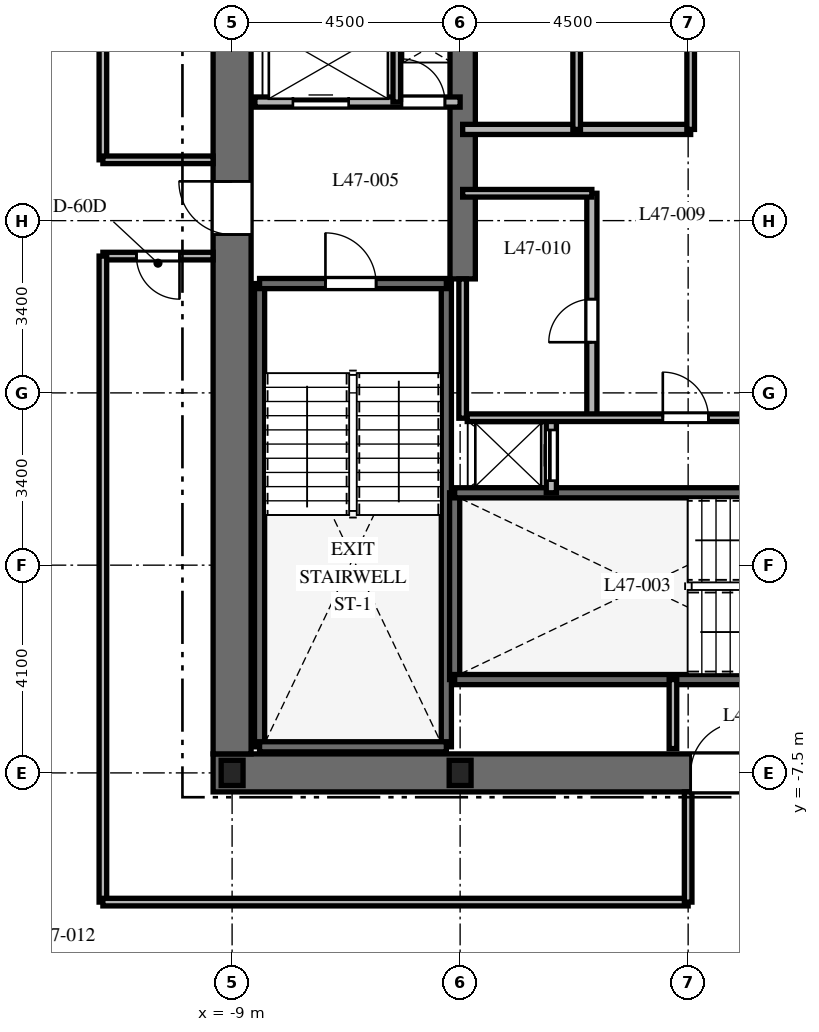
"""IFC4 building model, lengths in metres.
Left out: names, types, materials, properties, quantities, classifications, styles, units other than length and angle.
Written with IfcOpenShell. Run it as: python <this file> out.ifc"""

import sys

from ifc_helpers import new_model, si_unit, direction, frame, frame_2d, origin, origin_2d, place, context, subcontext, project, spatial, rectangle, i_section, extrude, element, fill, save


model = new_model("IFC4")
c1 = context("Model", 3, precision=1e-05, world=origin(), true_north=direction((0.0, 1.0)))
c2 = subcontext(c1, "Body", "Model", "MODEL_VIEW")
j1 = project(units=[si_unit("LENGTHUNIT", "METRE"), si_unit("PLANEANGLEUNIT", "RADIAN")], contexts=[c1])
p1 = place(None, origin())
s1 = spatial("IfcSite", under=j1, at=p1, CompositionType="ELEMENT")
p2 = place(p1, origin())
s2 = spatial("IfcBuilding", under=s1, at=p2, CompositionType="ELEMENT")
p3 = place(p2, frame((0.0, 0.0, 190.4)))
s3 = spatial("IfcBuildingStorey", under=s2, at=p3, CompositionType="ELEMENT", Elevation=190.4)
p4 = place(p3, frame((-9.375, -7.5, 0.0), z_axis=(0.0, 0.0, 1.0), x_axis=(1.0, 0.0, 0.0)))
e1 = element("IfcWall", 1, at=p4, inside=s3, PredefinedType="SHEAR", context=c2, shape_type="SweptSolid", body=[
    extrude(rectangle(XDim=18.75, YDim=0.75, at=frame_2d((9.375, 0.0))), origin(), (0.0, 0.0, 1.0), 3.7),
])
p5 = place(p4, frame((9.425, 0.0, 0.0)))
e2 = element("IfcOpeningElement", 2, at=p5, cuts=e1, PredefinedType="OPENING", context=c2, shape_type="SweptSolid", body=[
    extrude(rectangle(XDim=1.0, YDim=2.15, at=frame_2d((0.5, 1.075))), frame((0.0, 0.385, 0.0), z_axis=(0.0, -1.0, 0.0), x_axis=(1.0, 0.0, 0.0)), (0.0, 0.0, 1.0), 0.77),
])
p6 = place(p3, frame((-9.0, -7.125, 0.0), z_axis=(0.0, 0.0, 1.0), x_axis=(0.0, 1.0, 0.0)))
e3 = element("IfcWall", 3, at=p6, inside=s3, PredefinedType="SHEAR", context=c2, shape_type="SweptSolid", body=[
    extrude(rectangle(XDim=14.25, YDim=0.75, at=frame_2d((7.125, 0.0))), origin(), (0.0, 0.0, 1.0), 3.7),
])
p7 = place(p6, frame((10.25, 0.0, 0.0)))
e4 = element("IfcOpeningElement", 4, at=p7, cuts=e3, PredefinedType="OPENING", context=c2, shape_type="SweptSolid", body=[
    extrude(rectangle(XDim=1.05, YDim=2.15, at=frame_2d((0.525, 1.075))), frame((0.0, 0.385, 0.0), z_axis=(0.0, -1.0, 0.0), x_axis=(1.0, 0.0, 0.0)), (0.0, 0.0, 1.0), 0.77),
])
p8 = place(p3, frame((-4.45, 2.25, 0.0), z_axis=(0.0, 0.0, 1.0), x_axis=(0.0, 1.0, 0.0)))
e5 = element("IfcWall", 5, at=p8, inside=s3, PredefinedType="SHEAR", context=c2, shape_type="SweptSolid", body=[
    extrude(rectangle(XDim=4.875, YDim=0.5, at=frame_2d((2.438, 0.0))), origin(), (0.0, 0.0, 1.0), 3.7),
])
for number, where, z_axis, x_axis in (
    (6, (-8.458, -6.985, 0.0), (0.0, 0.0, 1.0), (0.0, 1.0, 0.0)),
    (7, (-4.772, -6.985, 0.0), (0.0, 0.0, 1.0), (0.0, 1.0, 0.0)),
):
    element("IfcWall", number, at=place(p3, frame(where, z_axis=z_axis, x_axis=x_axis)), inside=s3, PredefinedType="SHEAR", context=c2, shape_type="SweptSolid", body=[
        extrude(rectangle(XDim=9.143, YDim=0.2, at=frame_2d((4.572, 0.0))), origin(), (0.0, 0.0, 1.0), 3.7),
    ])
p9 = place(p3, frame((-8.458, -6.985, 0.0), z_axis=(0.0, 0.0, 1.0), x_axis=(1.0, 0.0, 0.0)))
e8 = element("IfcWall", 8, at=p9, inside=s3, PredefinedType="SHEAR", context=c2, shape_type="SweptSolid", body=[
    extrude(rectangle(XDim=3.686, YDim=0.2, at=frame_2d((1.843, 0.0))), origin(), (0.0, 0.0, 1.0), 3.7),
])
p10 = place(p3, frame((-8.458, 2.158, 0.0), z_axis=(0.0, 0.0, 1.0), x_axis=(1.0, 0.0, 0.0)))
e9 = element("IfcWall", 9, at=p10, inside=s3, PredefinedType="SHEAR", context=c2, shape_type="SweptSolid", body=[
    extrude(rectangle(XDim=3.686, YDim=0.2, at=frame_2d((1.843, 0.0))), origin(), (0.0, 0.0, 1.0), 3.7),
])
p11 = place(p10, frame((1.3, 0.0, 0.0)))
e10 = element("IfcOpeningElement", 10, at=p11, cuts=e9, PredefinedType="OPENING", context=c2, shape_type="SweptSolid", body=[
    extrude(rectangle(XDim=1.0, YDim=2.15, at=frame_2d((0.5, 1.075))), frame((0.0, 0.11, 0.0), z_axis=(0.0, -1.0, 0.0), x_axis=(1.0, 0.0, 0.0)), (0.0, 0.0, 1.0), 0.22),
])
p12 = place(p3, frame((-4.608, -5.658, 0.0), z_axis=(0.0, 0.0, 1.0), x_axis=(0.0, 1.0, 0.0)))
e11 = element("IfcWall", 11, at=p12, inside=s3, PredefinedType="SHEAR", context=c2, shape_type="SweptSolid", body=[
    extrude(rectangle(XDim=3.686, YDim=0.2, at=frame_2d((1.843, 0.0))), origin(), (0.0, 0.0, 1.0), 3.7),
])
p13 = place(p3, frame((-4.608, -5.658, 0.0), z_axis=(0.0, 0.0, 1.0), x_axis=(1.0, 0.0, 0.0)))
e12 = element("IfcWall", 12, at=p13, inside=s3, PredefinedType="SHEAR", context=c2, shape_type="SweptSolid", body=[
    extrude(rectangle(XDim=9.166, YDim=0.2, at=frame_2d((4.583, 0.0))), origin(), (0.0, 0.0, 1.0), 3.7),
])
p14 = place(p13, frame((7.45, 0.0, 0.0)))
e13 = element("IfcOpeningElement", 13, at=p14, cuts=e12, PredefinedType="OPENING", context=c2, shape_type="SweptSolid", body=[
    extrude(rectangle(XDim=1.0, YDim=2.15, at=frame_2d((0.5, 1.075))), frame((0.0, 0.11, 0.0), z_axis=(0.0, -1.0, 0.0), x_axis=(1.0, 0.0, 0.0)), (0.0, 0.0, 1.0), 0.22),
])
p15 = place(p3, frame((-4.608, -1.972, 0.0), z_axis=(0.0, 0.0, 1.0), x_axis=(1.0, 0.0, 0.0)))
e14 = element("IfcWall", 14, at=p15, inside=s3, PredefinedType="SHEAR", context=c2, shape_type="SweptSolid", body=[
    extrude(rectangle(XDim=9.166, YDim=0.2, at=frame_2d((4.583, 0.0))), origin(), (0.0, 0.0, 1.0), 3.7),
])
for number, where, z_axis, x_axis in (
    (15, (-9.0, -7.5, 0.0), (0.0, 0.0, 1.0), (1.0, 0.0, 0.0)),
    (16, (-4.5, -7.5, 0.0), (0.0, 0.0, 1.0), (1.0, 0.0, 0.0)),
):
    element("IfcColumn", number, at=place(p3, frame(where, z_axis=z_axis, x_axis=x_axis)), inside=s3, PredefinedType="COLUMN", context=c2, shape_type="SweptSolid", body=[
        extrude(i_section(OverallWidth=0.432, OverallDepth=0.498, WebThickness=0.056, FlangeThickness=0.089, at=origin_2d()), origin(), (0.0, 0.0, 1.0), 3.7),
    ])
p16 = place(p3, frame((-0.3, -7.02, 0.0), z_axis=(0.0, 0.0, 1.0), x_axis=(0.0, 1.0, 0.0)))
e17 = element("IfcWall", 17, at=p16, inside=s3, PredefinedType="PARTITIONING", context=c2, shape_type="SweptSolid", body=[
    extrude(rectangle(XDim=1.362, YDim=0.15, at=frame_2d((0.681, 0.0))), origin(), (0.0, 0.0, 1.0), 3.4),
])
p17 = place(p3, frame((-8.55, 5.74, 0.0), z_axis=(0.0, 0.0, 1.0), x_axis=(1.0, 0.0, 0.0)))
e18 = element("IfcWall", 18, at=p17, inside=s3, PredefinedType="PARTITIONING", context=c2, shape_type="SweptSolid", body=[
    extrude(rectangle(XDim=4.05, YDim=0.2, at=frame_2d((2.025, 0.0))), origin(), (0.0, 0.0, 1.0), 3.4),
])
p18 = place(p17, frame((0.75, 0.0, 0.0)))
e19 = element("IfcOpeningElement", 19, at=p18, cuts=e18, PredefinedType="OPENING", context=c2, shape_type="SweptSolid", body=[
    extrude(rectangle(XDim=1.1, YDim=2.2, at=frame_2d((0.55, 1.1))), frame((0.0, 0.11, 0.0), z_axis=(0.0, -1.0, 0.0), x_axis=(1.0, 0.0, 0.0)), (0.0, 0.0, 1.0), 0.22),
])
p19 = place(p17, frame((2.9, 0.0, 0.0)))
e20 = element("IfcOpeningElement", 20, at=p19, cuts=e18, PredefinedType="OPENING", context=c2, shape_type="SweptSolid", body=[
    extrude(rectangle(XDim=0.85, YDim=2.03, at=frame_2d((0.425, 1.015))), frame((0.0, 0.11, 0.0), z_axis=(0.0, -1.0, 0.0), x_axis=(1.0, 0.0, 0.0)), (0.0, 0.0, 1.0), 0.22),
])
p20 = place(p3, frame((-5.75, 5.74, 0.0), z_axis=(0.0, 0.0, 1.0), x_axis=(0.0, 1.0, 0.0)))
e21 = element("IfcWall", 21, at=p20, inside=s3, PredefinedType="PARTITIONING", context=c2, shape_type="SweptSolid", body=[
    extrude(rectangle(XDim=1.41, YDim=0.15, at=frame_2d((0.705, 0.0))), origin(), (0.0, 0.0, 1.0), 3.4),
])
p21 = place(p3, frame((-2.7, -1.972, 0.0), z_axis=(0.0, 0.0, 1.0), x_axis=(0.0, 1.0, 0.0)))
e22 = element("IfcWall", 22, at=p21, inside=s3, PredefinedType="PARTITIONING", context=c2, shape_type="SweptSolid", body=[
    extrude(rectangle(XDim=1.472, YDim=0.2, at=frame_2d((0.736, 0.0))), origin(), (0.0, 0.0, 1.0), 3.4),
])
p22 = place(p21, frame((0.24, 0.0, 0.0)))
e23 = element("IfcOpeningElement", 23, at=p22, cuts=e22, PredefinedType="OPENING", context=c2, shape_type="SweptSolid", body=[
    extrude(rectangle(XDim=1.0, YDim=2.2, at=frame_2d((0.5, 1.1))), frame((0.0, 0.11, 0.0), z_axis=(0.0, -1.0, 0.0), x_axis=(1.0, 0.0, 0.0)), (0.0, 0.0, 1.0), 0.22),
])
p23 = place(p3, frame((-4.45, 5.2, 0.0), z_axis=(0.0, 0.0, 1.0), x_axis=(1.0, 0.0, 0.0)))
e24 = element("IfcWall", 24, at=p23, inside=s3, PredefinedType="PARTITIONING", context=c2, shape_type="SweptSolid", body=[
    extrude(rectangle(XDim=4.5, YDim=0.2, at=frame_2d((2.25, 0.0))), origin(), (0.0, 0.0, 1.0), 3.4),
])
p24 = place(p3, frame((-2.2, 5.2, 0.0), z_axis=(0.0, 0.0, 1.0), x_axis=(0.0, 1.0, 0.0)))
e25 = element("IfcWall", 25, at=p24, inside=s3, PredefinedType="PARTITIONING", context=c2, shape_type="SweptSolid", body=[
    extrude(rectangle(XDim=1.85, YDim=0.15, at=frame_2d((0.925, 0.0))), origin(), (0.0, 0.0, 1.0), 3.4),
])
p25 = place(p3, frame((0.05, 5.2, 0.0), z_axis=(0.0, 0.0, 1.0), x_axis=(0.0, 1.0, 0.0)))
e26 = element("IfcWall", 26, at=p25, inside=s3, PredefinedType="PARTITIONING", context=c2, shape_type="SweptSolid", body=[
    extrude(rectangle(XDim=1.95, YDim=0.15, at=frame_2d((0.975, 0.0))), origin(), (0.0, 0.0, 1.0), 3.4),
])
p26 = place(p3, frame((-4.45, -0.5, 0.0), z_axis=(0.0, 0.0, 1.0), x_axis=(0.0, 1.0, 0.0)))
e27 = element("IfcWall", 27, at=p26, inside=s3, PredefinedType="PARTITIONING", context=c2, shape_type="SweptSolid", body=[
    extrude(rectangle(XDim=2.75, YDim=0.15, at=frame_2d((1.375, 0.0))), origin(), (0.0, 0.0, 1.0), 3.4),
])
p27 = place(p3, frame((-1.9, -0.5, 0.0), z_axis=(0.0, 0.0, 1.0), x_axis=(0.0, 1.0, 0.0)))
e28 = element("IfcWall", 28, at=p27, inside=s3, PredefinedType="PARTITIONING", context=c2, shape_type="SweptSolid", body=[
    extrude(rectangle(XDim=4.44, YDim=0.2, at=frame_2d((2.22, 0.0))), origin(), (0.0, 0.0, 1.0), 3.4),
])
p28 = place(p27, frame((1.5, 0.0, 0.0)))
e29 = element("IfcOpeningElement", 29, at=p28, cuts=e28, PredefinedType="OPENING", context=c2, shape_type="SweptSolid", body=[
    extrude(rectangle(XDim=0.85, YDim=2.03, at=frame_2d((0.425, 1.015))), frame((0.0, 0.11, 0.0), z_axis=(0.0, -1.0, 0.0), x_axis=(1.0, 0.0, 0.0)), (0.0, 0.0, 1.0), 0.22),
])
p29 = place(p3, frame((-4.45, 3.94, 0.0), z_axis=(0.0, 0.0, 1.0), x_axis=(1.0, 0.0, 0.0)))
e30 = element("IfcWall", 30, at=p29, inside=s3, PredefinedType="PARTITIONING", context=c2, shape_type="SweptSolid", body=[
    extrude(rectangle(XDim=2.55, YDim=0.15, at=frame_2d((1.275, 0.0))), origin(), (0.0, 0.0, 1.0), 3.4),
])
p30 = place(p3, frame((-4.36, -0.49, 0.0), z_axis=(0.0, 0.0, 1.0), x_axis=(1.0, 0.0, 0.0)))
e31 = element("IfcWall", 31, at=p30, inside=s3, PredefinedType="PARTITIONING", context=c2, shape_type="SweptSolid", body=[
    extrude(rectangle(XDim=8.72, YDim=0.15, at=frame_2d((4.36, 0.0))), origin(), (0.0, 0.0, 1.0), 3.4),
])
p31 = place(p30, frame((3.86, 0.0, 0.0)))
e32 = element("IfcOpeningElement", 32, at=p31, cuts=e31, PredefinedType="OPENING", context=c2, shape_type="SweptSolid", body=[
    extrude(rectangle(XDim=0.9, YDim=2.03, at=frame_2d((0.45, 1.015))), frame((0.0, 0.085, 0.0), z_axis=(0.0, -1.0, 0.0), x_axis=(1.0, 0.0, 0.0)), (0.0, 0.0, 1.0), 0.17),
])
p32 = place(p3, frame((-11.55, 10.05, 0.0), z_axis=(0.0, 0.0, 1.0), x_axis=(0.0, -1.0, 0.0)))
e33 = element("IfcWall", 33, at=p32, inside=s3, PredefinedType="PARTITIONING", context=c2, shape_type="SweptSolid", body=[
    extrude(rectangle(XDim=5.45, YDim=0.15, at=frame_2d((2.725, 0.0))), origin(), (0.0, 0.0, 1.0), 2.84),
])
p33 = place(p3, frame((-11.55, 4.6, 0.0), z_axis=(0.0, 0.0, 1.0), x_axis=(1.0, 0.0, 0.0)))
e34 = element("IfcWall", 34, at=p33, inside=s3, PredefinedType="PARTITIONING", context=c2, shape_type="SweptSolid", body=[
    extrude(rectangle(XDim=2.175, YDim=0.15, at=frame_2d((1.087, 0.0))), origin(), (0.0, 0.0, 1.0), 3.4),
])
p34 = place(p3, frame((-9.375, 2.7, 0.0), z_axis=(0.0, 0.0, 1.0), x_axis=(-1.0, 0.0, 0.0)))
e35 = element("IfcWall", 35, at=p34, inside=s3, PredefinedType="PARTITIONING", context=c2, shape_type="SweptSolid", body=[
    extrude(rectangle(XDim=2.175, YDim=0.15, at=frame_2d((1.087, 0.0))), origin(), (0.0, 0.0, 1.0), 3.4),
])
p35 = place(p34, frame((0.663, 0.0, 0.0)))
e36 = element("IfcOpeningElement", 36, at=p35, cuts=e35, PredefinedType="OPENING", context=c2, shape_type="SweptSolid", body=[
    extrude(rectangle(XDim=0.85, YDim=2.03, at=frame_2d((0.425, 1.015))), frame((0.0, 0.085, 0.0), z_axis=(0.0, -1.0, 0.0), x_axis=(1.0, 0.0, 0.0)), (0.0, 0.0, 1.0), 0.17),
])
p36 = place(p3, frame((-11.55, 2.7, 0.0), z_axis=(0.0, 0.0, 1.0), x_axis=(0.0, -1.0, 0.0)))
e37 = element("IfcWall", 37, at=p36, inside=s3, PredefinedType="PARTITIONING", context=c2, shape_type="SweptSolid", body=[
    extrude(rectangle(XDim=12.75, YDim=0.15, at=frame_2d((6.375, 0.0))), origin(), (0.0, 0.0, 1.0), 2.84),
])
p37 = place(p3, frame((-11.55, -10.05, 0.0), z_axis=(0.0, 0.0, 1.0), x_axis=(1.0, 0.0, 0.0)))
e38 = element("IfcWall", 38, at=p37, inside=s3, PredefinedType="PARTITIONING", context=c2, shape_type="SweptSolid", body=[
    extrude(rectangle(XDim=11.55, YDim=0.15, at=frame_2d((5.775, 0.0))), origin(), (0.0, 0.0, 1.0), 2.84),
])
p38 = place(p3, frame((0.0, -10.05, 0.0), z_axis=(0.0, 0.0, 1.0), x_axis=(0.0, 1.0, 0.0)))
e39 = element("IfcWall", 39, at=p38, inside=s3, PredefinedType="PARTITIONING", context=c2, shape_type="SweptSolid", body=[
    extrude(rectangle(XDim=2.175, YDim=0.15, at=frame_2d((1.087, 0.0))), origin(), (0.0, 0.0, 1.0), 3.4),
])
p39 = place(p11, origin())
e40 = element("IfcDoor", 40, at=p39, inside=s3, OperationType="SINGLE_SWING_LEFT", PredefinedType="DOOR", context=c2, shape_type="SweptSolid", body=[
    extrude(rectangle(XDim=1.0, YDim=2.15, at=frame_2d((0.5, 1.075))), frame((0.0, 0.025, 0.0), z_axis=(0.0, -1.0, 0.0), x_axis=(1.0, 0.0, 0.0)), (0.0, 0.0, 1.0), 0.05),
])
fill(e10, e40)
p40 = place(p5, origin())
e41 = element("IfcDoor", 41, at=p40, inside=s3, OperationType="SINGLE_SWING_RIGHT", PredefinedType="DOOR", context=c2, shape_type="SweptSolid", body=[
    extrude(rectangle(XDim=1.0, YDim=2.15, at=frame_2d((0.5, 1.075))), frame((0.0, 0.025, 0.0), z_axis=(0.0, -1.0, 0.0), x_axis=(1.0, 0.0, 0.0)), (0.0, 0.0, 1.0), 0.05),
])
fill(e2, e41)
p41 = place(p7, origin())
e42 = element("IfcDoor", 42, at=p41, inside=s3, OperationType="SINGLE_SWING_RIGHT", PredefinedType="DOOR", context=c2, shape_type="SweptSolid", body=[
    extrude(rectangle(XDim=1.05, YDim=2.15, at=frame_2d((0.525, 1.075))), frame((0.0, 0.025, 0.0), z_axis=(0.0, -1.0, 0.0), x_axis=(1.0, 0.0, 0.0)), (0.0, 0.0, 1.0), 0.05),
])
fill(e4, e42)
p42 = place(p18, origin())
e43 = element("IfcDoor", 43, at=p42, inside=s3, OperationType="SLIDING_TO_LEFT", PredefinedType="DOOR", context=c2, shape_type="SweptSolid", body=[
    extrude(rectangle(XDim=1.1, YDim=2.2, at=frame_2d((0.55, 1.1))), frame((0.0, 0.025, 0.0), z_axis=(0.0, -1.0, 0.0), x_axis=(1.0, 0.0, 0.0)), (0.0, 0.0, 1.0), 0.05),
])
fill(e19, e43)
p43 = place(p19, origin())
e44 = element("IfcDoor", 44, at=p43, inside=s3, OperationType="SINGLE_SWING_LEFT", PredefinedType="DOOR", context=c2, shape_type="SweptSolid", body=[
    extrude(rectangle(XDim=0.85, YDim=2.03, at=frame_2d((0.425, 1.015))), frame((0.0, 0.025, 0.0), z_axis=(0.0, -1.0, 0.0), x_axis=(1.0, 0.0, 0.0)), (0.0, 0.0, 1.0), 0.05),
])
fill(e20, e44)
p44 = place(p22, origin())
e45 = element("IfcDoor", 45, at=p44, inside=s3, OperationType="SLIDING_TO_LEFT", PredefinedType="DOOR", context=c2, shape_type="SweptSolid", body=[
    extrude(rectangle(XDim=1.0, YDim=2.2, at=frame_2d((0.5, 1.1))), frame((0.0, 0.025, 0.0), z_axis=(0.0, -1.0, 0.0), x_axis=(1.0, 0.0, 0.0)), (0.0, 0.0, 1.0), 0.05),
])
fill(e23, e45)
p45 = place(p28, origin())
e46 = element("IfcDoor", 46, at=p45, inside=s3, OperationType="SINGLE_SWING_LEFT", PredefinedType="DOOR", context=c2, shape_type="SweptSolid", body=[
    extrude(rectangle(XDim=0.85, YDim=2.03, at=frame_2d((0.425, 1.015))), frame((0.0, 0.025, 0.0), z_axis=(0.0, -1.0, 0.0), x_axis=(1.0, 0.0, 0.0)), (0.0, 0.0, 1.0), 0.05),
])
fill(e29, e46)
p46 = place(p31, origin())
e47 = element("IfcDoor", 47, at=p46, inside=s3, OperationType="SINGLE_SWING_LEFT", PredefinedType="DOOR", context=c2, shape_type="SweptSolid", body=[
    extrude(rectangle(XDim=0.9, YDim=2.03, at=frame_2d((0.45, 1.015))), frame((0.0, 0.025, 0.0), z_axis=(0.0, -1.0, 0.0), x_axis=(1.0, 0.0, 0.0)), (0.0, 0.0, 1.0), 0.05),
])
fill(e32, e47)
p47 = place(p35, origin())
e48 = element("IfcDoor", 48, at=p47, inside=s3, OperationType="SINGLE_SWING_LEFT", PredefinedType="DOOR", context=c2, shape_type="SweptSolid", body=[
    extrude(rectangle(XDim=0.85, YDim=2.03, at=frame_2d((0.425, 1.015))), frame((0.0, 0.025, 0.0), z_axis=(0.0, -1.0, 0.0), x_axis=(1.0, 0.0, 0.0)), (0.0, 0.0, 1.0), 0.05),
])
fill(e36, e48)
save(model, sys.argv[1])
